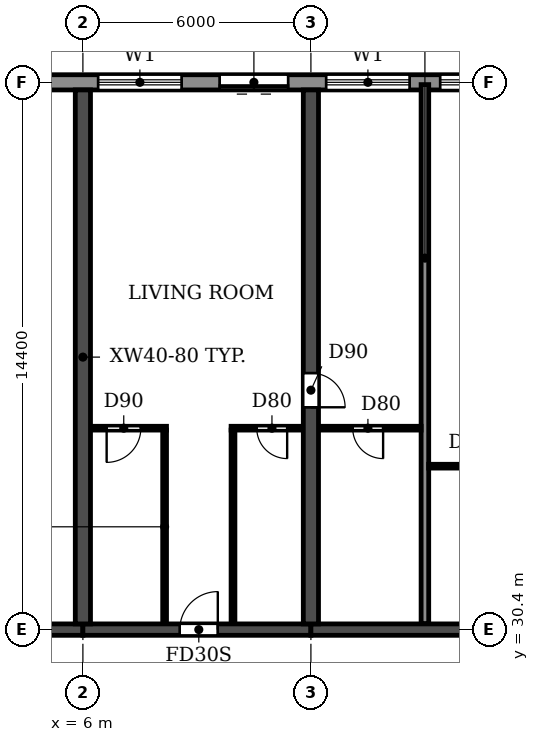
"""IFC4 building model, lengths in metres.
Left out: names, types, materials, properties, quantities, classifications, styles, units other than length and angle.
Written with IfcOpenShell. Run it as: python <this file> out.ifc"""

import sys

from ifc_helpers import new_model, si_unit, direction, frame, frame_2d, origin, place, context, subcontext, project, spatial, rectangle, extrude, element, fill, save


model = new_model("IFC4")
c1 = context("Model", 3, precision=1e-05, world=origin(), true_north=direction((0.0, 1.0)))
c2 = subcontext(c1, "Body", "Model", "MODEL_VIEW")
j1 = project(units=[si_unit("LENGTHUNIT", "METRE"), si_unit("PLANEANGLEUNIT", "RADIAN")], contexts=[c1])
p1 = place(None, origin())
s1 = spatial("IfcSite", under=j1, at=p1, CompositionType="ELEMENT")
p2 = place(p1, origin())
s2 = spatial("IfcBuilding", under=s1, at=p2, CompositionType="ELEMENT")
p3 = place(p2, frame((0.0, 0.0, 23.4)))
s3 = spatial("IfcBuildingStorey", under=s2, at=p3, CompositionType="ELEMENT", Elevation=23.4)
p4 = place(p3, frame((6.0, 30.55, 0.0), z_axis=(0.0, 0.0, 1.0), x_axis=(0.0, 1.0, 0.0)))
e1 = element("IfcWall", 1, at=p4, inside=s3, PredefinedType="SHEAR", context=c2, shape_type="SweptSolid", body=[
    extrude(rectangle(XDim=14.05, YDim=0.4, at=frame_2d((7.025, 0.0))), origin(), (0.0, 0.0, 1.0), 3.05),
])
p5 = place(p3, frame((12.0, 30.55, 0.0), z_axis=(0.0, 0.0, 1.0), x_axis=(0.0, 1.0, 0.0)))
e2 = element("IfcWall", 2, at=p5, inside=s3, PredefinedType="SHEAR", context=c2, shape_type="SweptSolid", body=[
    extrude(rectangle(XDim=14.05, YDim=0.4, at=frame_2d((7.025, 0.0))), origin(), (0.0, 0.0, 1.0), 3.05),
])
p6 = place(p5, frame((5.7, 0.0, 0.0)))
e3 = element("IfcOpeningElement", 3, at=p6, cuts=e2, PredefinedType="OPENING", context=c2, shape_type="SweptSolid", body=[
    extrude(rectangle(XDim=0.9, YDim=2.1, at=frame_2d((0.45, 1.05))), frame((0.0, 0.21, 0.0), z_axis=(0.0, -1.0, 0.0), x_axis=(1.0, 0.0, 0.0)), (0.0, 0.0, 1.0), 0.42),
])
p7 = place(p3, frame((0.2, 30.4, 0.0), z_axis=(0.0, 0.0, 1.0), x_axis=(1.0, 0.0, 0.0)))
e4 = element("IfcWall", 4, at=p7, inside=s3, PredefinedType="SHEAR", context=c2, shape_type="SweptSolid", body=[
    extrude(rectangle(XDim=5.8, YDim=0.3, at=frame_2d((2.9, 0.0))), origin(), (0.0, 0.0, 1.0), 2.45),
])
p8 = place(p7, frame((2.3, 0.0, 0.0)))
e5 = element("IfcOpeningElement", 5, at=p8, cuts=e4, PredefinedType="OPENING", context=c2, shape_type="SweptSolid", body=[
    extrude(rectangle(XDim=1.0, YDim=2.1, at=frame_2d((0.5, 1.05))), frame((0.0, 0.16, 0.0), z_axis=(0.0, -1.0, 0.0), x_axis=(1.0, 0.0, 0.0)), (0.0, 0.0, 1.0), 0.32),
])
p9 = place(p3, frame((6.0, 30.4, 0.0), z_axis=(0.0, 0.0, 1.0), x_axis=(1.0, 0.0, 0.0)))
e6 = element("IfcWall", 6, at=p9, inside=s3, PredefinedType="SHEAR", context=c2, shape_type="SweptSolid", body=[
    extrude(rectangle(XDim=6.0, YDim=0.3, at=frame_2d((3.0, 0.0))), origin(), (0.0, 0.0, 1.0), 2.45),
])
p10 = place(p9, frame((2.55, 0.0, 0.0)))
e7 = element("IfcOpeningElement", 7, at=p10, cuts=e6, PredefinedType="OPENING", context=c2, shape_type="SweptSolid", body=[
    extrude(rectangle(XDim=1.0, YDim=2.1, at=frame_2d((0.5, 1.05))), frame((0.0, 0.16, 0.0), z_axis=(0.0, -1.0, 0.0), x_axis=(1.0, 0.0, 0.0)), (0.0, 0.0, 1.0), 0.32),
])
p11 = place(p3, frame((12.0, 30.4, 0.0), z_axis=(0.0, 0.0, 1.0), x_axis=(1.0, 0.0, 0.0)))
e8 = element("IfcWall", 8, at=p11, inside=s3, PredefinedType="SHEAR", context=c2, shape_type="SweptSolid", body=[
    extrude(rectangle(XDim=6.0, YDim=0.3, at=frame_2d((3.0, 0.0))), origin(), (0.0, 0.0, 1.0), 2.45),
])
p12 = place(p3, frame((97.317, 44.8, 0.0), z_axis=(0.0, 0.0, 1.0), x_axis=(-1.0, 0.0, 0.0)))
e9 = element("IfcWall", 9, at=p12, inside=s3, PredefinedType="STANDARD", context=c2, shape_type="SweptSolid", body=[
    extrude(rectangle(XDim=92.634, YDim=0.4, at=frame_2d((46.317, 0.0))), origin(), (0.0, 0.0, 1.0), 3.05),
])
p13 = place(p12, frame((88.717, 0.0, 0.9)))
e10 = element("IfcOpeningElement", 10, at=p13, cuts=e9, PredefinedType="OPENING", context=c2, shape_type="SweptSolid", body=[
    extrude(rectangle(XDim=2.2, YDim=1.5, at=frame_2d((1.1, 0.75))), frame((0.0, 0.21, 0.0), z_axis=(0.0, -1.0, 0.0), x_axis=(1.0, 0.0, 0.0)), (0.0, 0.0, 1.0), 0.42),
])
p14 = place(p12, frame((85.917, 0.0, 0.0)))
e11 = element("IfcOpeningElement", 11, at=p14, cuts=e9, PredefinedType="OPENING", context=c2, shape_type="SweptSolid", body=[
    extrude(rectangle(XDim=1.8, YDim=2.4, at=frame_2d((0.9, 1.2))), frame((0.0, 0.21, 0.0), z_axis=(0.0, -1.0, 0.0), x_axis=(1.0, 0.0, 0.0)), (0.0, 0.0, 1.0), 0.42),
])
p15 = place(p12, frame((82.717, 0.0, 0.9)))
e12 = element("IfcOpeningElement", 12, at=p15, cuts=e9, PredefinedType="OPENING", context=c2, shape_type="SweptSolid", body=[
    extrude(rectangle(XDim=2.2, YDim=1.5, at=frame_2d((1.1, 0.75))), frame((0.0, 0.21, 0.0), z_axis=(0.0, -1.0, 0.0), x_axis=(1.0, 0.0, 0.0)), (0.0, 0.0, 1.0), 0.42),
])
p16 = place(p12, frame((79.717, 0.0, 0.9)))
e13 = element("IfcOpeningElement", 13, at=p16, cuts=e9, PredefinedType="OPENING", context=c2, shape_type="SweptSolid", body=[
    extrude(rectangle(XDim=2.2, YDim=1.5, at=frame_2d((1.1, 0.75))), frame((0.0, 0.21, 0.0), z_axis=(0.0, -1.0, 0.0), x_axis=(1.0, 0.0, 0.0)), (0.0, 0.0, 1.0), 0.42),
])
p17 = place(p12, frame((76.917, 0.0, 0.0)))
e14 = element("IfcOpeningElement", 14, at=p17, cuts=e9, PredefinedType="OPENING", context=c2, shape_type="SweptSolid", body=[
    extrude(rectangle(XDim=1.8, YDim=2.4, at=frame_2d((0.9, 1.2))), frame((0.0, 0.21, 0.0), z_axis=(0.0, -1.0, 0.0), x_axis=(1.0, 0.0, 0.0)), (0.0, 0.0, 1.0), 0.42),
])
p18 = place(p12, frame((73.717, 0.0, 0.9)))
e15 = element("IfcOpeningElement", 15, at=p18, cuts=e9, PredefinedType="OPENING", context=c2, shape_type="SweptSolid", body=[
    extrude(rectangle(XDim=2.2, YDim=1.5, at=frame_2d((1.1, 0.75))), frame((0.0, 0.21, 0.0), z_axis=(0.0, -1.0, 0.0), x_axis=(1.0, 0.0, 0.0)), (0.0, 0.0, 1.0), 0.42),
])
p19 = place(p12, frame((70.717, 0.0, 0.9)))
e16 = element("IfcOpeningElement", 16, at=p19, cuts=e9, PredefinedType="OPENING", context=c2, shape_type="SweptSolid", body=[
    extrude(rectangle(XDim=2.2, YDim=1.5, at=frame_2d((1.1, 0.75))), frame((0.0, 0.21, 0.0), z_axis=(0.0, -1.0, 0.0), x_axis=(1.0, 0.0, 0.0)), (0.0, 0.0, 1.0), 0.42),
])
p20 = place(p12, frame((67.717, 0.0, 0.9)))
e17 = element("IfcOpeningElement", 17, at=p20, cuts=e9, PredefinedType="OPENING", context=c2, shape_type="SweptSolid", body=[
    extrude(rectangle(XDim=2.2, YDim=1.5, at=frame_2d((1.1, 0.75))), frame((0.0, 0.21, 0.0), z_axis=(0.0, -1.0, 0.0), x_axis=(1.0, 0.0, 0.0)), (0.0, 0.0, 1.0), 0.42),
])
p21 = place(p12, frame((64.917, 0.0, 0.0)))
e18 = element("IfcOpeningElement", 18, at=p21, cuts=e9, PredefinedType="OPENING", context=c2, shape_type="SweptSolid", body=[
    extrude(rectangle(XDim=1.8, YDim=2.4, at=frame_2d((0.9, 1.2))), frame((0.0, 0.21, 0.0), z_axis=(0.0, -1.0, 0.0), x_axis=(1.0, 0.0, 0.0)), (0.0, 0.0, 1.0), 0.42),
])
p22 = place(p12, frame((61.717, 0.0, 0.9)))
e19 = element("IfcOpeningElement", 19, at=p22, cuts=e9, PredefinedType="OPENING", context=c2, shape_type="SweptSolid", body=[
    extrude(rectangle(XDim=2.2, YDim=1.5, at=frame_2d((1.1, 0.75))), frame((0.0, 0.21, 0.0), z_axis=(0.0, -1.0, 0.0), x_axis=(1.0, 0.0, 0.0)), (0.0, 0.0, 1.0), 0.42),
])
p23 = place(p12, frame((58.717, 0.0, 0.9)))
e20 = element("IfcOpeningElement", 20, at=p23, cuts=e9, PredefinedType="OPENING", context=c2, shape_type="SweptSolid", body=[
    extrude(rectangle(XDim=2.2, YDim=1.5, at=frame_2d((1.1, 0.75))), frame((0.0, 0.21, 0.0), z_axis=(0.0, -1.0, 0.0), x_axis=(1.0, 0.0, 0.0)), (0.0, 0.0, 1.0), 0.42),
])
p24 = place(p12, frame((55.917, 0.0, 0.0)))
e21 = element("IfcOpeningElement", 21, at=p24, cuts=e9, PredefinedType="OPENING", context=c2, shape_type="SweptSolid", body=[
    extrude(rectangle(XDim=1.8, YDim=2.4, at=frame_2d((0.9, 1.2))), frame((0.0, 0.21, 0.0), z_axis=(0.0, -1.0, 0.0), x_axis=(1.0, 0.0, 0.0)), (0.0, 0.0, 1.0), 0.42),
])
p25 = place(p12, frame((52.917, 0.0, 0.0)))
e22 = element("IfcOpeningElement", 22, at=p25, cuts=e9, PredefinedType="OPENING", context=c2, shape_type="SweptSolid", body=[
    extrude(rectangle(XDim=1.8, YDim=2.4, at=frame_2d((0.9, 1.2))), frame((0.0, 0.21, 0.0), z_axis=(0.0, -1.0, 0.0), x_axis=(1.0, 0.0, 0.0)), (0.0, 0.0, 1.0), 0.42),
])
p26 = place(p12, frame((49.717, 0.0, 0.9)))
e23 = element("IfcOpeningElement", 23, at=p26, cuts=e9, PredefinedType="OPENING", context=c2, shape_type="SweptSolid", body=[
    extrude(rectangle(XDim=2.2, YDim=1.5, at=frame_2d((1.1, 0.75))), frame((0.0, 0.21, 0.0), z_axis=(0.0, -1.0, 0.0), x_axis=(1.0, 0.0, 0.0)), (0.0, 0.0, 1.0), 0.42),
])
p27 = place(p12, frame((46.917, 0.0, 0.0)))
e24 = element("IfcOpeningElement", 24, at=p27, cuts=e9, PredefinedType="OPENING", context=c2, shape_type="SweptSolid", body=[
    extrude(rectangle(XDim=1.8, YDim=2.4, at=frame_2d((0.9, 1.2))), frame((0.0, 0.21, 0.0), z_axis=(0.0, -1.0, 0.0), x_axis=(1.0, 0.0, 0.0)), (0.0, 0.0, 1.0), 0.42),
])
p28 = place(p12, frame((43.717, 0.0, 0.9)))
e25 = element("IfcOpeningElement", 25, at=p28, cuts=e9, PredefinedType="OPENING", context=c2, shape_type="SweptSolid", body=[
    extrude(rectangle(XDim=2.2, YDim=1.5, at=frame_2d((1.1, 0.75))), frame((0.0, 0.21, 0.0), z_axis=(0.0, -1.0, 0.0), x_axis=(1.0, 0.0, 0.0)), (0.0, 0.0, 1.0), 0.42),
])
p29 = place(p12, frame((40.717, 0.0, 0.9)))
e26 = element("IfcOpeningElement", 26, at=p29, cuts=e9, PredefinedType="OPENING", context=c2, shape_type="SweptSolid", body=[
    extrude(rectangle(XDim=2.2, YDim=1.5, at=frame_2d((1.1, 0.75))), frame((0.0, 0.21, 0.0), z_axis=(0.0, -1.0, 0.0), x_axis=(1.0, 0.0, 0.0)), (0.0, 0.0, 1.0), 0.42),
])
p30 = place(p12, frame((37.917, 0.0, 0.0)))
e27 = element("IfcOpeningElement", 27, at=p30, cuts=e9, PredefinedType="OPENING", context=c2, shape_type="SweptSolid", body=[
    extrude(rectangle(XDim=1.8, YDim=2.4, at=frame_2d((0.9, 1.2))), frame((0.0, 0.21, 0.0), z_axis=(0.0, -1.0, 0.0), x_axis=(1.0, 0.0, 0.0)), (0.0, 0.0, 1.0), 0.42),
])
p31 = place(p12, frame((34.917, 0.0, 0.0)))
e28 = element("IfcOpeningElement", 28, at=p31, cuts=e9, PredefinedType="OPENING", context=c2, shape_type="SweptSolid", body=[
    extrude(rectangle(XDim=1.8, YDim=2.4, at=frame_2d((0.9, 1.2))), frame((0.0, 0.21, 0.0), z_axis=(0.0, -1.0, 0.0), x_axis=(1.0, 0.0, 0.0)), (0.0, 0.0, 1.0), 0.42),
])
p32 = place(p12, frame((31.717, 0.0, 0.9)))
e29 = element("IfcOpeningElement", 29, at=p32, cuts=e9, PredefinedType="OPENING", context=c2, shape_type="SweptSolid", body=[
    extrude(rectangle(XDim=2.2, YDim=1.5, at=frame_2d((1.1, 0.75))), frame((0.0, 0.21, 0.0), z_axis=(0.0, -1.0, 0.0), x_axis=(1.0, 0.0, 0.0)), (0.0, 0.0, 1.0), 0.42),
])
p33 = place(p12, frame((28.717, 0.0, 0.9)))
e30 = element("IfcOpeningElement", 30, at=p33, cuts=e9, PredefinedType="OPENING", context=c2, shape_type="SweptSolid", body=[
    extrude(rectangle(XDim=2.2, YDim=1.5, at=frame_2d((1.1, 0.75))), frame((0.0, 0.21, 0.0), z_axis=(0.0, -1.0, 0.0), x_axis=(1.0, 0.0, 0.0)), (0.0, 0.0, 1.0), 0.42),
])
p34 = place(p12, frame((25.717, 0.0, 0.9)))
e31 = element("IfcOpeningElement", 31, at=p34, cuts=e9, PredefinedType="OPENING", context=c2, shape_type="SweptSolid", body=[
    extrude(rectangle(XDim=2.2, YDim=1.5, at=frame_2d((1.1, 0.75))), frame((0.0, 0.21, 0.0), z_axis=(0.0, -1.0, 0.0), x_axis=(1.0, 0.0, 0.0)), (0.0, 0.0, 1.0), 0.42),
])
p35 = place(p12, frame((22.717, 0.0, 0.9)))
e32 = element("IfcOpeningElement", 32, at=p35, cuts=e9, PredefinedType="OPENING", context=c2, shape_type="SweptSolid", body=[
    extrude(rectangle(XDim=2.2, YDim=1.5, at=frame_2d((1.1, 0.75))), frame((0.0, 0.21, 0.0), z_axis=(0.0, -1.0, 0.0), x_axis=(1.0, 0.0, 0.0)), (0.0, 0.0, 1.0), 0.42),
])
p36 = place(p12, frame((19.917, 0.0, 0.0)))
e33 = element("IfcOpeningElement", 33, at=p36, cuts=e9, PredefinedType="OPENING", context=c2, shape_type="SweptSolid", body=[
    extrude(rectangle(XDim=1.8, YDim=2.4, at=frame_2d((0.9, 1.2))), frame((0.0, 0.21, 0.0), z_axis=(0.0, -1.0, 0.0), x_axis=(1.0, 0.0, 0.0)), (0.0, 0.0, 1.0), 0.42),
])
p37 = place(p12, frame((16.717, 0.0, 0.9)))
e34 = element("IfcOpeningElement", 34, at=p37, cuts=e9, PredefinedType="OPENING", context=c2, shape_type="SweptSolid", body=[
    extrude(rectangle(XDim=2.2, YDim=1.5, at=frame_2d((1.1, 0.75))), frame((0.0, 0.21, 0.0), z_axis=(0.0, -1.0, 0.0), x_axis=(1.0, 0.0, 0.0)), (0.0, 0.0, 1.0), 0.42),
])
p38 = place(p12, frame((13.717, 0.0, 0.9)))
e35 = element("IfcOpeningElement", 35, at=p38, cuts=e9, PredefinedType="OPENING", context=c2, shape_type="SweptSolid", body=[
    extrude(rectangle(XDim=2.2, YDim=1.5, at=frame_2d((1.1, 0.75))), frame((0.0, 0.21, 0.0), z_axis=(0.0, -1.0, 0.0), x_axis=(1.0, 0.0, 0.0)), (0.0, 0.0, 1.0), 0.42),
])
p39 = place(p12, frame((10.717, 0.0, 0.9)))
e36 = element("IfcOpeningElement", 36, at=p39, cuts=e9, PredefinedType="OPENING", context=c2, shape_type="SweptSolid", body=[
    extrude(rectangle(XDim=2.2, YDim=1.5, at=frame_2d((1.1, 0.75))), frame((0.0, 0.21, 0.0), z_axis=(0.0, -1.0, 0.0), x_axis=(1.0, 0.0, 0.0)), (0.0, 0.0, 1.0), 0.42),
])
p40 = place(p12, frame((7.917, 0.0, 0.0)))
e37 = element("IfcOpeningElement", 37, at=p40, cuts=e9, PredefinedType="OPENING", context=c2, shape_type="SweptSolid", body=[
    extrude(rectangle(XDim=1.8, YDim=2.4, at=frame_2d((0.9, 1.2))), frame((0.0, 0.21, 0.0), z_axis=(0.0, -1.0, 0.0), x_axis=(1.0, 0.0, 0.0)), (0.0, 0.0, 1.0), 0.42),
])
p41 = place(p12, frame((4.917, 0.0, 0.0)))
e38 = element("IfcOpeningElement", 38, at=p41, cuts=e9, PredefinedType="OPENING", context=c2, shape_type="SweptSolid", body=[
    extrude(rectangle(XDim=1.8, YDim=2.4, at=frame_2d((0.9, 1.2))), frame((0.0, 0.21, 0.0), z_axis=(0.0, -1.0, 0.0), x_axis=(1.0, 0.0, 0.0)), (0.0, 0.0, 1.0), 0.42),
])
p42 = place(p12, frame((1.717, 0.0, 0.9)))
e39 = element("IfcOpeningElement", 39, at=p42, cuts=e9, PredefinedType="OPENING", context=c2, shape_type="SweptSolid", body=[
    extrude(rectangle(XDim=2.2, YDim=1.5, at=frame_2d((1.1, 0.75))), frame((0.0, 0.21, 0.0), z_axis=(0.0, -1.0, 0.0), x_axis=(1.0, 0.0, 0.0)), (0.0, 0.0, 1.0), 0.42),
])
p43 = place(p3, frame((15.0, 30.56, 0.0), z_axis=(0.0, 0.0, 1.0), x_axis=(0.0, 1.0, 0.0)))
e40 = element("IfcWall", 40, at=p43, inside=s3, PredefinedType="PARTITIONING", context=c2, shape_type="SweptSolid", body=[
    extrude(rectangle(XDim=14.18, YDim=0.2, at=frame_2d((7.09, 0.0))), origin(), (0.0, 0.0, 1.0), 3.05),
])
p44 = place(p3, frame((15.1, 34.7, 0.0), z_axis=(0.0, 0.0, 1.0), x_axis=(1.0, 0.0, 0.0)))
e41 = element("IfcWall", 41, at=p44, inside=s3, PredefinedType="PARTITIONING", context=c2, shape_type="SweptSolid", body=[
    extrude(rectangle(XDim=2.69, YDim=0.1, at=frame_2d((1.345, 0.0))), origin(), (0.0, 0.0, 1.0), 3.05),
])
p45 = place(p44, frame((1.0, 0.0, 0.0)))
e42 = element("IfcOpeningElement", 42, at=p45, cuts=e41, PredefinedType="OPENING", context=c2, shape_type="SweptSolid", body=[
    extrude(rectangle(XDim=0.8, YDim=2.1, at=frame_2d((0.4, 1.05))), frame((0.0, 0.06, 0.0), z_axis=(0.0, -1.0, 0.0), x_axis=(1.0, 0.0, 0.0)), (0.0, 0.0, 1.0), 0.12),
])
p46 = place(p3, frame((6.21, 35.7, 0.0), z_axis=(0.0, 0.0, 1.0), x_axis=(1.0, 0.0, 0.0)))
e43 = element("IfcWall", 43, at=p46, inside=s3, PredefinedType="PARTITIONING", context=c2, shape_type="SweptSolid", body=[
    extrude(rectangle(XDim=1.99, YDim=0.1, at=frame_2d((0.995, 0.0))), origin(), (0.0, 0.0, 1.0), 3.05),
])
p47 = place(p46, frame((0.415, 0.0, 0.0)))
e44 = element("IfcOpeningElement", 44, at=p47, cuts=e43, PredefinedType="OPENING", context=c2, shape_type="SweptSolid", body=[
    extrude(rectangle(XDim=0.9, YDim=2.1, at=frame_2d((0.45, 1.05))), frame((0.0, 0.06, 0.0), z_axis=(0.0, -1.0, 0.0), x_axis=(1.0, 0.0, 0.0)), (0.0, 0.0, 1.0), 0.12),
])
p48 = place(p3, frame((9.9, 35.7, 0.0), z_axis=(0.0, 0.0, 1.0), x_axis=(1.0, 0.0, 0.0)))
e45 = element("IfcWall", 45, at=p48, inside=s3, PredefinedType="PARTITIONING", context=c2, shape_type="SweptSolid", body=[
    extrude(rectangle(XDim=1.89, YDim=0.1, at=frame_2d((0.945, 0.0))), origin(), (0.0, 0.0, 1.0), 3.05),
])
p49 = place(p48, frame((0.675, 0.0, 0.0)))
e46 = element("IfcOpeningElement", 46, at=p49, cuts=e45, PredefinedType="OPENING", context=c2, shape_type="SweptSolid", body=[
    extrude(rectangle(XDim=0.8, YDim=2.1, at=frame_2d((0.4, 1.05))), frame((0.0, 0.06, 0.0), z_axis=(0.0, -1.0, 0.0), x_axis=(1.0, 0.0, 0.0)), (0.0, 0.0, 1.0), 0.12),
])
p50 = place(p3, frame((12.21, 35.7, 0.0), z_axis=(0.0, 0.0, 1.0), x_axis=(1.0, 0.0, 0.0)))
e47 = element("IfcWall", 47, at=p50, inside=s3, PredefinedType="PARTITIONING", context=c2, shape_type="SweptSolid", body=[
    extrude(rectangle(XDim=2.69, YDim=0.1, at=frame_2d((1.345, 0.0))), origin(), (0.0, 0.0, 1.0), 3.05),
])
p51 = place(p50, frame((0.89, 0.0, 0.0)))
e48 = element("IfcOpeningElement", 48, at=p51, cuts=e47, PredefinedType="OPENING", context=c2, shape_type="SweptSolid", body=[
    extrude(rectangle(XDim=0.8, YDim=2.1, at=frame_2d((0.4, 1.05))), frame((0.0, 0.06, 0.0), z_axis=(0.0, -1.0, 0.0), x_axis=(1.0, 0.0, 0.0)), (0.0, 0.0, 1.0), 0.12),
])
for number, where, z_axis, x_axis in (
    (49, (8.15, 30.56, 0.0), (0.0, 0.0, 1.0), (0.0, 1.0, 0.0)),
    (50, (9.95, 30.56, 0.0), (0.0, 0.0, 1.0), (0.0, 1.0, 0.0)),
):
    element("IfcWall", number, at=place(p3, frame(where, z_axis=z_axis, x_axis=x_axis)), inside=s3, PredefinedType="PARTITIONING", context=c2, shape_type="SweptSolid", body=[
        extrude(rectangle(XDim=5.09, YDim=0.1, at=frame_2d((2.545, 0.0))), origin(), (0.0, 0.0, 1.0), 3.05),
    ])
p52 = place(p13, origin())
e51 = element("IfcWindow", 51, at=p52, inside=s3, PartitioningType="DOUBLE_PANEL_HORIZONTAL", PredefinedType="WINDOW", context=c2, shape_type="SweptSolid", body=[
    extrude(rectangle(XDim=2.2, YDim=1.5, at=frame_2d((1.1, 0.75))), frame((0.0, 0.03, 0.0), z_axis=(0.0, -1.0, 0.0), x_axis=(1.0, 0.0, 0.0)), (0.0, 0.0, 1.0), 0.06),
])
fill(e10, e51)
p53 = place(p14, origin())
e52 = element("IfcDoor", 52, at=p53, inside=s3, OperationType="DOUBLE_DOOR_SLIDING", PredefinedType="DOOR", context=c2, shape_type="SweptSolid", body=[
    extrude(rectangle(XDim=1.8, YDim=2.4, at=frame_2d((0.9, 1.2))), frame((0.0, 0.025, 0.0), z_axis=(0.0, -1.0, 0.0), x_axis=(1.0, 0.0, 0.0)), (0.0, 0.0, 1.0), 0.05),
])
fill(e11, e52)
p54 = place(p15, origin())
e53 = element("IfcWindow", 53, at=p54, inside=s3, PartitioningType="DOUBLE_PANEL_HORIZONTAL", PredefinedType="WINDOW", context=c2, shape_type="SweptSolid", body=[
    extrude(rectangle(XDim=2.2, YDim=1.5, at=frame_2d((1.1, 0.75))), frame((0.0, 0.03, 0.0), z_axis=(0.0, -1.0, 0.0), x_axis=(1.0, 0.0, 0.0)), (0.0, 0.0, 1.0), 0.06),
])
fill(e12, e53)
p55 = place(p16, origin())
e54 = element("IfcWindow", 54, at=p55, inside=s3, PartitioningType="DOUBLE_PANEL_HORIZONTAL", PredefinedType="WINDOW", context=c2, shape_type="SweptSolid", body=[
    extrude(rectangle(XDim=2.2, YDim=1.5, at=frame_2d((1.1, 0.75))), frame((0.0, 0.03, 0.0), z_axis=(0.0, -1.0, 0.0), x_axis=(1.0, 0.0, 0.0)), (0.0, 0.0, 1.0), 0.06),
])
fill(e13, e54)
p56 = place(p51, frame((0.8, 0.0, 0.0), z_axis=(0.0, 0.0, 1.0), x_axis=(-1.0, 0.0, 0.0)))
e55 = element("IfcDoor", 55, at=p56, inside=s3, OperationType="SINGLE_SWING_LEFT", PredefinedType="DOOR", context=c2, shape_type="SweptSolid", body=[
    extrude(rectangle(XDim=0.8, YDim=2.1, at=frame_2d((0.4, 1.05))), frame((0.0, 0.025, 0.0), z_axis=(0.0, -1.0, 0.0), x_axis=(1.0, 0.0, 0.0)), (0.0, 0.0, 1.0), 0.05),
])
fill(e48, e55)
p57 = place(p47, frame((0.9, 0.0, 0.0), z_axis=(0.0, 0.0, 1.0), x_axis=(-1.0, 0.0, 0.0)))
e56 = element("IfcDoor", 56, at=p57, inside=s3, OperationType="SINGLE_SWING_RIGHT", PredefinedType="DOOR", context=c2, shape_type="SweptSolid", body=[
    extrude(rectangle(XDim=0.9, YDim=2.1, at=frame_2d((0.45, 1.05))), frame((0.0, 0.025, 0.0), z_axis=(0.0, -1.0, 0.0), x_axis=(1.0, 0.0, 0.0)), (0.0, 0.0, 1.0), 0.05),
])
fill(e44, e56)
p58 = place(p10, origin())
e57 = element("IfcDoor", 57, at=p58, inside=s3, OperationType="SINGLE_SWING_RIGHT", PredefinedType="DOOR", context=c2, shape_type="SweptSolid", body=[
    extrude(rectangle(XDim=1.0, YDim=2.1, at=frame_2d((0.5, 1.05))), frame((0.0, 0.025, 0.0), z_axis=(0.0, -1.0, 0.0), x_axis=(1.0, 0.0, 0.0)), (0.0, 0.0, 1.0), 0.05),
])
fill(e7, e57)
p59 = place(p49, frame((0.8, 0.0, 0.0), z_axis=(0.0, 0.0, 1.0), x_axis=(-1.0, 0.0, 0.0)))
e58 = element("IfcDoor", 58, at=p59, inside=s3, OperationType="SINGLE_SWING_LEFT", PredefinedType="DOOR", context=c2, shape_type="SweptSolid", body=[
    extrude(rectangle(XDim=0.8, YDim=2.1, at=frame_2d((0.4, 1.05))), frame((0.0, 0.025, 0.0), z_axis=(0.0, -1.0, 0.0), x_axis=(1.0, 0.0, 0.0)), (0.0, 0.0, 1.0), 0.05),
])
fill(e46, e58)
p60 = place(p6, frame((0.9, 0.0, 0.0), z_axis=(0.0, 0.0, 1.0), x_axis=(-1.0, 0.0, 0.0)))
e59 = element("IfcDoor", 59, at=p60, inside=s3, OperationType="SINGLE_SWING_RIGHT", PredefinedType="DOOR", context=c2, shape_type="SweptSolid", body=[
    extrude(rectangle(XDim=0.9, YDim=2.1, at=frame_2d((0.45, 1.05))), frame((0.0, 0.025, 0.0), z_axis=(0.0, -1.0, 0.0), x_axis=(1.0, 0.0, 0.0)), (0.0, 0.0, 1.0), 0.05),
])
fill(e3, e59)
save(model, sys.argv[1])
